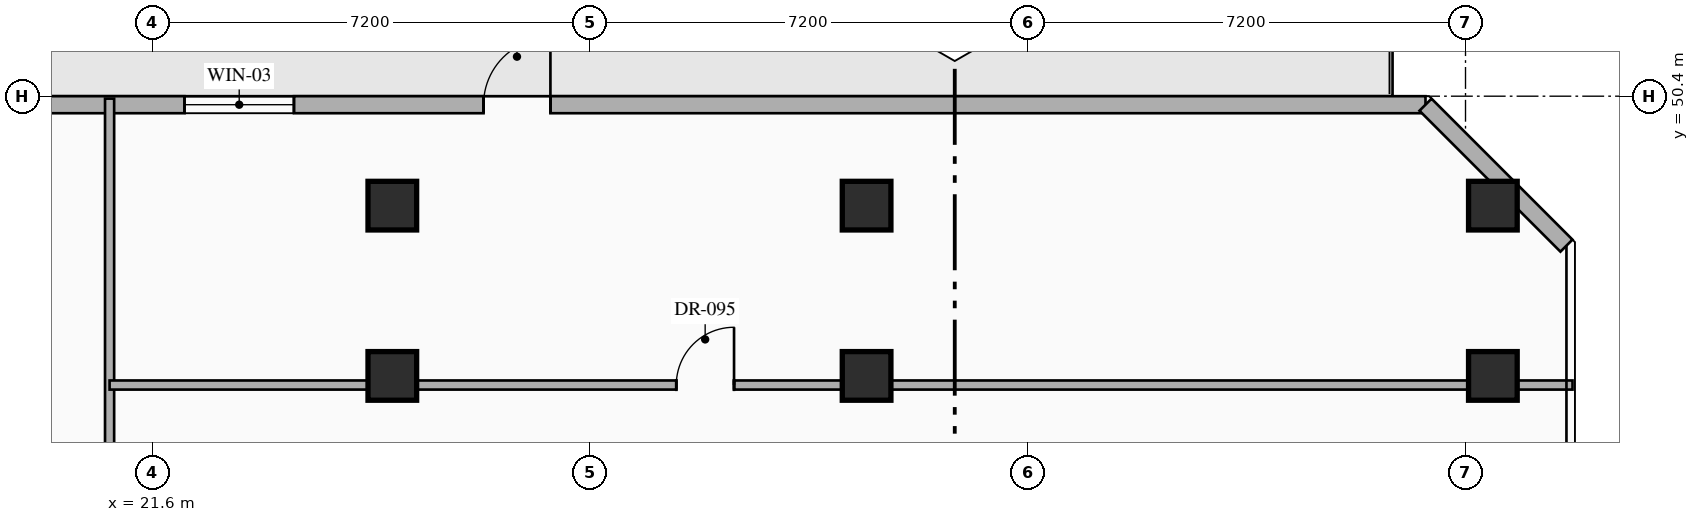
"""IFC4 building model, lengths in metres.
Left out: names, types, materials, properties, quantities, classifications, styles, units other than length and angle.
Written with IfcOpenShell. Run it as: python <this file> out.ifc"""

import sys

from ifc_helpers import new_model, si_unit, direction, frame, frame_2d, origin, origin_2d, place, context, subcontext, project, spatial, rectangle, hollow_rectangle, extrude, element, fill, save


model = new_model("IFC4")
c1 = context("Model", 3, precision=1e-05, world=origin(), true_north=direction((0.0, 1.0)))
c2 = subcontext(c1, "Body", "Model", "MODEL_VIEW")
j1 = project(units=[si_unit("LENGTHUNIT", "METRE"), si_unit("PLANEANGLEUNIT", "RADIAN")], contexts=[c1])
p1 = place(None, origin())
s1 = spatial("IfcSite", under=j1, at=p1, CompositionType="ELEMENT")
p2 = place(p1, origin())
s2 = spatial("IfcBuilding", under=s1, at=p2, CompositionType="ELEMENT")
p3 = place(p2, frame((0.0, 0.0, 170.85)))
s3 = spatial("IfcBuildingStorey", under=s2, at=p3, CompositionType="ELEMENT", Elevation=170.85)
for number, where, z_axis, x_axis in (
    (1, (25.55, 45.8, 0.0), (0.0, 0.0, 1.0), (1.0, 0.0, 0.0)),
    (2, (33.35, 45.8, 0.0), (0.0, 0.0, 1.0), (1.0, 0.0, 0.0)),
    (3, (43.65, 45.8, 0.0), (0.0, 0.0, 1.0), (1.0, 0.0, 0.0)),
    (4, (25.55, 48.6, 0.0), (0.0, 0.0, 1.0), (1.0, 0.0, 0.0)),
    (5, (33.35, 48.6, 0.0), (0.0, 0.0, 1.0), (1.0, 0.0, 0.0)),
    (6, (43.65, 48.6, 0.0), (0.0, 0.0, 1.0), (1.0, 0.0, 0.0)),
):
    element("IfcColumn", number, at=place(p3, frame(where, z_axis=z_axis, x_axis=x_axis)), inside=s3, PredefinedType="COLUMN", context=c2, shape_type="SweptSolid", body=[
        extrude(hollow_rectangle(XDim=0.8, YDim=0.8, WallThickness=0.032, at=origin_2d()), origin(), (0.0, 0.0, 1.0), 3.6),
    ])
p4 = place(p3, frame((12.058, 50.26, 0.0), z_axis=(0.0, 0.0, 1.0), x_axis=(1.0, 0.0, 0.0)))
e7 = element("IfcWall", 7, at=p4, inside=s3, PredefinedType="STANDARD", context=c2, shape_type="SweptSolid", body=[
    extrude(rectangle(XDim=30.484, YDim=0.28, at=frame_2d((15.242, 0.0))), origin(), (0.0, 0.0, 1.0), 3.35),
])
p5 = place(p4, frame((14.992, 0.0, 0.0)))
e8 = element("IfcOpeningElement", 8, at=p5, cuts=e7, PredefinedType="OPENING", context=c2, shape_type="SweptSolid", body=[
    extrude(rectangle(XDim=1.1, YDim=2.2, at=frame_2d((0.55, 1.1))), frame((0.0, 0.15, 0.0), z_axis=(0.0, -1.0, 0.0), x_axis=(1.0, 0.0, 0.0)), (0.0, 0.0, 1.0), 0.3),
])
p6 = place(p4, frame((10.074, 0.0, 0.85)))
e9 = element("IfcOpeningElement", 9, at=p6, cuts=e7, PredefinedType="OPENING", context=c2, shape_type="SweptSolid", body=[
    extrude(rectangle(XDim=1.8, YDim=2.1, at=frame_2d((0.9, 1.05))), frame((0.0, 0.15, 0.0), z_axis=(0.0, -1.0, 0.0), x_axis=(1.0, 0.0, 0.0)), (0.0, 0.0, 1.0), 0.3),
])
p7 = place(p3, frame((42.542, 50.26, 0.0), z_axis=(0.0, 0.0, 1.0), x_axis=(0.707106781187, -0.707106781187, 0.0)))
e10 = element("IfcWall", 10, at=p7, inside=s3, PredefinedType="STANDARD", context=c2, shape_type="SweptSolid", body=[
    extrude(rectangle(XDim=3.278, YDim=0.28, at=frame_2d((1.639, 0.0))), origin(), (0.0, 0.0, 1.0), 3.35),
])
p8 = place(p3, frame((20.9, 23.44, 0.0), z_axis=(0.0, 0.0, 1.0), x_axis=(0.0, 1.0, 0.0)))
e11 = element("IfcWall", 11, at=p8, inside=s3, PredefinedType="PARTITIONING", context=c2, shape_type="SweptSolid", body=[
    extrude(rectangle(XDim=26.92, YDim=0.15, at=frame_2d((13.46, 0.0))), origin(), (0.0, 0.0, 1.0), 3.35),
])
p9 = place(p8, frame((7.943, 0.0, 0.0)))
e12 = element("IfcOpeningElement", 12, at=p9, cuts=e11, PredefinedType="OPENING", context=c2, shape_type="SweptSolid", body=[
    extrude(rectangle(XDim=0.95, YDim=2.15, at=frame_2d((0.475, 1.075))), frame((0.0, 0.085, 0.0), z_axis=(0.0, -1.0, 0.0), x_axis=(1.0, 0.0, 0.0)), (0.0, 0.0, 1.0), 0.17),
])
p10 = place(p3, frame((20.9, 45.65, 0.0), z_axis=(0.0, 0.0, 1.0), x_axis=(1.0, 0.0, 0.0)))
e13 = element("IfcWall", 13, at=p10, inside=s3, PredefinedType="PARTITIONING", context=c2, shape_type="SweptSolid", body=[
    extrude(rectangle(XDim=24.06, YDim=0.15, at=frame_2d((12.03, 0.0))), origin(), (0.0, 0.0, 1.0), 2.695),
])
p11 = place(p10, frame((9.32, 0.0, 0.0)))
e14 = element("IfcOpeningElement", 14, at=p11, cuts=e13, PredefinedType="OPENING", context=c2, shape_type="SweptSolid", body=[
    extrude(rectangle(XDim=0.95, YDim=2.15, at=frame_2d((0.475, 1.075))), frame((0.0, 0.085, 0.0), z_axis=(0.0, -1.0, 0.0), x_axis=(1.0, 0.0, 0.0)), (0.0, 0.0, 1.0), 0.17),
])
p12 = place(p5, origin())
e15 = element("IfcDoor", 15, at=p12, inside=s3, OperationType="SINGLE_SWING_RIGHT", PredefinedType="DOOR", context=c2, shape_type="SweptSolid", body=[
    extrude(rectangle(XDim=1.1, YDim=2.2, at=frame_2d((0.55, 1.1))), frame((0.0, 0.025, 0.0), z_axis=(0.0, -1.0, 0.0), x_axis=(1.0, 0.0, 0.0)), (0.0, 0.0, 1.0), 0.05),
])
fill(e8, e15)
p13 = place(p6, origin())
e16 = element("IfcWindow", 16, at=p13, inside=s3, PartitioningType="SINGLE_PANEL", PredefinedType="WINDOW", context=c2, shape_type="SweptSolid", body=[
    extrude(rectangle(XDim=1.8, YDim=2.1, at=frame_2d((0.9, 1.05))), frame((0.0, 0.03, 0.0), z_axis=(0.0, -1.0, 0.0), x_axis=(1.0, 0.0, 0.0)), (0.0, 0.0, 1.0), 0.06),
])
fill(e9, e16)
p14 = place(p11, origin())
e17 = element("IfcDoor", 17, at=p14, inside=s3, OperationType="SINGLE_SWING_RIGHT", PredefinedType="DOOR", context=c2, shape_type="SweptSolid", body=[
    extrude(rectangle(XDim=0.95, YDim=2.15, at=frame_2d((0.475, 1.075))), frame((0.0, 0.025, 0.0), z_axis=(0.0, -1.0, 0.0), x_axis=(1.0, 0.0, 0.0)), (0.0, 0.0, 1.0), 0.05),
])
fill(e14, e17)
save(model, sys.argv[1])
